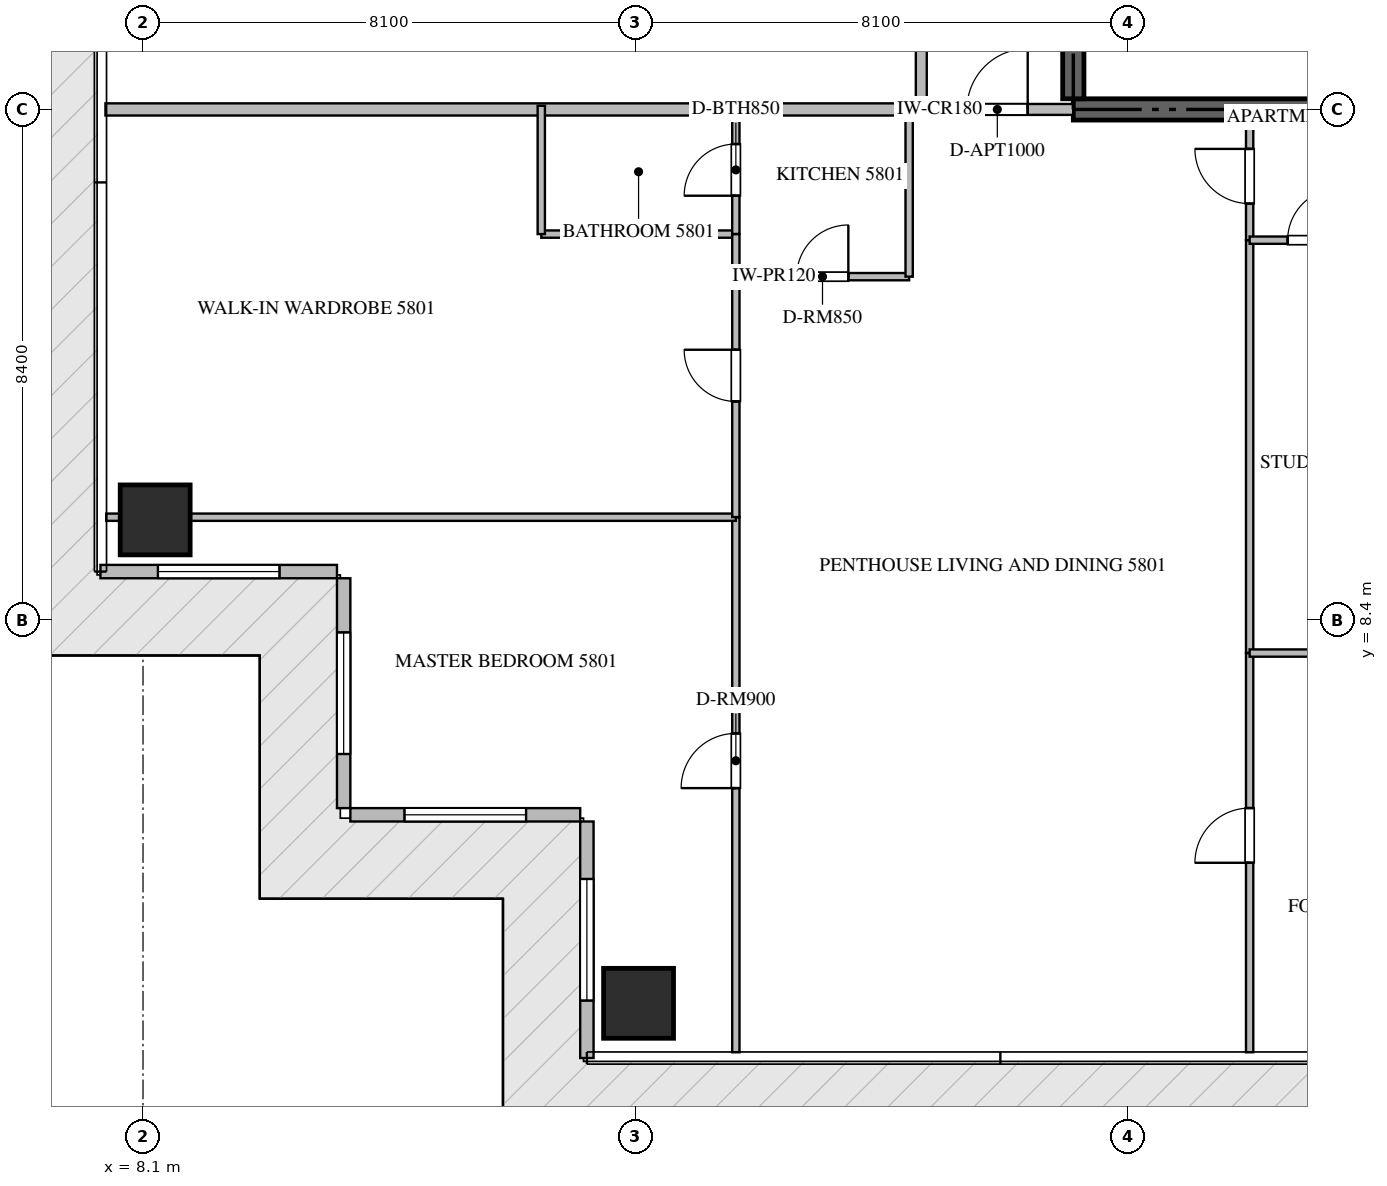
"""IFC4 building model, lengths in metres.
Left out: names, types, materials, properties, quantities, classifications, styles, units other than length and angle.
Written with IfcOpenShell. Run it as: python <this file> out.ifc"""

import sys

from ifc_helpers import new_model, si_unit, direction, frame, frame_2d, origin, origin_2d, place, context, subcontext, project, spatial, rectangle, extrude, source, transform, mapped, element, fill, save


model = new_model("IFC4")
c1 = context("Model", 3, precision=1e-05, world=origin(), true_north=direction((0.0, 1.0)))
c2 = subcontext(c1, "Body", "Model", "MODEL_VIEW")
j1 = project(units=[si_unit("LENGTHUNIT", "METRE"), si_unit("PLANEANGLEUNIT", "RADIAN")], contexts=[c1])
p1 = place(None, origin())
s1 = spatial("IfcSite", under=j1, at=p1, CompositionType="ELEMENT")
p2 = place(p1, origin())
s2 = spatial("IfcBuilding", under=s1, at=p2, CompositionType="ELEMENT")
p3 = place(p2, frame((0.0, 0.0, 233.55)))
s3 = spatial("IfcBuildingStorey", under=s2, at=p3, CompositionType="ELEMENT", Elevation=233.55)
p4 = place(p3, frame((23.4, 16.8, -0.26), z_axis=(0.0, 0.0, 1.0), x_axis=(1.0, 0.0, 0.0)))
e1 = element("IfcWall", 1, at=p4, inside=s3, PredefinedType="SHEAR", context=c2, shape_type="SweptSolid", body=[
    extrude(rectangle(XDim=18.0, YDim=0.35, at=frame_2d((9.0, 0.0))), origin(), (0.0, 0.0, 1.0), 3.848),
])
p5 = place(p3, frame((23.4, 16.975, -0.26), z_axis=(0.0, 0.0, 1.0), x_axis=(0.0, 1.0, 0.0)))
e2 = element("IfcWall", 2, at=p5, inside=s3, PredefinedType="SHEAR", context=c2, shape_type="SweptSolid", body=[
    extrude(rectangle(XDim=4.875, YDim=0.35, at=frame_2d((2.438, 0.0))), origin(), (0.0, 0.0, 1.0), 3.848),
])
m1 = source(origin(), c2, "Body", "SweptSolid", [
    extrude(rectangle(XDim=1.15, YDim=1.15, at=origin_2d()), origin(), (0.0, 0.0, 1.0), 3.85),
])
for number, where, z_axis, x_axis in (
    (3, (16.25, 2.1, -0.26), (0.0, 0.0, 1.0), (1.0, 0.0, 0.0)),
    (4, (8.3, 10.05, -0.26), (0.0, 0.0, 1.0), (1.0, 0.0, 0.0)),
):
    element("IfcColumn", number, at=place(p3, frame(where, z_axis=z_axis, x_axis=x_axis)), inside=s3, PredefinedType="COLUMN", context=c2, shape_type="MappedRepresentation", body=[
        mapped(m1, transform((0.0, 0.0, 0.0), scale=1.0)),
    ])
p6 = place(p3, frame((7.4, 9.2, 0.0), z_axis=(0.0, 0.0, 1.0), x_axis=(1.0, 0.0, 0.0)))
e5 = element("IfcWall", 5, at=p6, inside=s3, PredefinedType="ELEMENTEDWALL", context=c2, shape_type="SweptSolid", body=[
    extrude(rectangle(XDim=3.89, YDim=0.22, at=frame_2d((1.945, 0.0))), origin(), (0.0, 0.0, 1.0), 3.575),
])
p7 = place(p6, frame((0.945, 0.0, 0.65)))
e6 = element("IfcOpeningElement", 6, at=p7, cuts=e5, PredefinedType="OPENING", context=c2, shape_type="SweptSolid", body=[
    extrude(rectangle(XDim=2.0, YDim=2.2, at=frame_2d((1.0, 1.1))), frame((0.0, 0.12, 0.0), z_axis=(0.0, -1.0, 0.0), x_axis=(1.0, 0.0, 0.0)), (0.0, 0.0, 1.0), 0.24),
])
p8 = place(p3, frame((11.4, 9.09, 0.0), z_axis=(0.0, 0.0, 1.0), x_axis=(0.0, -1.0, 0.0)))
e7 = element("IfcWall", 7, at=p8, inside=s3, PredefinedType="ELEMENTEDWALL", context=c2, shape_type="SweptSolid", body=[
    extrude(rectangle(XDim=3.78, YDim=0.22, at=frame_2d((1.89, 0.0))), origin(), (0.0, 0.0, 1.0), 3.575),
])
p9 = place(p8, frame((0.89, 0.0, 0.65)))
e8 = element("IfcOpeningElement", 8, at=p9, cuts=e7, PredefinedType="OPENING", context=c2, shape_type="SweptSolid", body=[
    extrude(rectangle(XDim=2.0, YDim=2.2, at=frame_2d((1.0, 1.1))), frame((0.0, 0.12, 0.0), z_axis=(0.0, -1.0, 0.0), x_axis=(1.0, 0.0, 0.0)), (0.0, 0.0, 1.0), 0.24),
])
p10 = place(p3, frame((11.51, 5.2, 0.0), z_axis=(0.0, 0.0, 1.0), x_axis=(1.0, 0.0, 0.0)))
e9 = element("IfcWall", 9, at=p10, inside=s3, PredefinedType="ELEMENTEDWALL", context=c2, shape_type="SweptSolid", body=[
    extrude(rectangle(XDim=3.78, YDim=0.22, at=frame_2d((1.89, 0.0))), origin(), (0.0, 0.0, 1.0), 3.575),
])
p11 = place(p10, frame((0.89, 0.0, 0.65)))
e10 = element("IfcOpeningElement", 10, at=p11, cuts=e9, PredefinedType="OPENING", context=c2, shape_type="SweptSolid", body=[
    extrude(rectangle(XDim=2.0, YDim=2.2, at=frame_2d((1.0, 1.1))), frame((0.0, 0.12, 0.0), z_axis=(0.0, -1.0, 0.0), x_axis=(1.0, 0.0, 0.0)), (0.0, 0.0, 1.0), 0.24),
])
p12 = place(p3, frame((15.4, 5.09, 0.0), z_axis=(0.0, 0.0, 1.0), x_axis=(0.0, -1.0, 0.0)))
e11 = element("IfcWall", 11, at=p12, inside=s3, PredefinedType="ELEMENTEDWALL", context=c2, shape_type="SweptSolid", body=[
    extrude(rectangle(XDim=3.89, YDim=0.22, at=frame_2d((1.945, 0.0))), origin(), (0.0, 0.0, 1.0), 3.575),
])
p13 = place(p12, frame((0.945, 0.0, 0.65)))
e12 = element("IfcOpeningElement", 12, at=p13, cuts=e11, PredefinedType="OPENING", context=c2, shape_type="SweptSolid", body=[
    extrude(rectangle(XDim=2.0, YDim=2.2, at=frame_2d((1.0, 1.1))), frame((0.0, 0.12, 0.0), z_axis=(0.0, -1.0, 0.0), x_axis=(1.0, 0.0, 0.0)), (0.0, 0.0, 1.0), 0.24),
])
p14 = place(p3, frame((7.482, 16.8, 0.0), z_axis=(0.0, 0.0, 1.0), x_axis=(1.0, 0.0, 0.0)))
e13 = element("IfcWall", 13, at=p14, inside=s3, PredefinedType="PARTITIONING", context=c2, shape_type="SweptSolid", body=[
    extrude(rectangle(XDim=13.418, YDim=0.2, at=frame_2d((6.709, 0.0))), origin(), (0.0, 0.0, 1.0), 3.59),
])
p15 = place(p3, frame((20.902, 16.8, 0.0), z_axis=(0.0, 0.0, 1.0), x_axis=(1.0, 0.0, 0.0)))
e14 = element("IfcWall", 14, at=p15, inside=s3, PredefinedType="PARTITIONING", context=c2, shape_type="SweptSolid", body=[
    extrude(rectangle(XDim=2.496, YDim=0.18, at=frame_2d((1.248, 0.0))), origin(), (0.0, 0.0, 1.0), 3.59),
])
p16 = place(p15, frame((0.748, 0.0, 0.0)))
e15 = element("IfcOpeningElement", 15, at=p16, cuts=e14, PredefinedType="OPENING", context=c2, shape_type="SweptSolid", body=[
    extrude(rectangle(XDim=1.0, YDim=2.15, at=frame_2d((0.5, 1.075))), frame((0.0, 0.1, 0.0), z_axis=(0.0, -1.0, 0.0), x_axis=(1.0, 0.0, 0.0)), (0.0, 0.0, 1.0), 0.2),
])
p17 = place(p3, frame((20.9, 16.8, 0.0), z_axis=(0.0, 0.0, 1.0), x_axis=(0.0, 1.0, 0.0)))
e16 = element("IfcWall", 16, at=p17, inside=s3, PredefinedType="PARTITIONING", context=c2, shape_type="SweptSolid", body=[
    extrude(rectangle(XDim=16.8, YDim=0.18, at=frame_2d((8.4, 0.0))), origin(), (0.0, 0.0, 1.0), 3.59),
])
p18 = place(p17, frame((2.67, 0.0, 0.0)))
e17 = element("IfcOpeningElement", 17, at=p18, cuts=e16, PredefinedType="OPENING", context=c2, shape_type="SweptSolid", body=[
    extrude(rectangle(XDim=1.0, YDim=2.15, at=frame_2d((0.5, 1.075))), frame((0.0, 0.1, 0.0), z_axis=(0.0, -1.0, 0.0), x_axis=(1.0, 0.0, 0.0)), (0.0, 0.0, 1.0), 0.2),
])
p19 = place(p17, frame((11.107, 0.0, 0.0)))
e18 = element("IfcOpeningElement", 18, at=p19, cuts=e16, PredefinedType="OPENING", context=c2, shape_type="SweptSolid", body=[
    extrude(rectangle(XDim=1.0, YDim=2.15, at=frame_2d((0.5, 1.075))), frame((0.0, 0.1, 0.0), z_axis=(0.0, -1.0, 0.0), x_axis=(1.0, 0.0, 0.0)), (0.0, 0.0, 1.0), 0.2),
])
p20 = place(p3, frame((17.85, 14.05, 0.0), z_axis=(0.0, 0.0, 1.0), x_axis=(1.0, 0.0, 0.0)))
e19 = element("IfcWall", 19, at=p20, inside=s3, PredefinedType="PARTITIONING", context=c2, shape_type="SweptSolid", body=[
    extrude(rectangle(XDim=2.85, YDim=0.12, at=frame_2d((1.425, 0.0))), origin(), (0.0, 0.0, 1.0), 3.59),
])
p21 = place(p20, frame((1.0, 0.0, 0.0)))
e20 = element("IfcOpeningElement", 20, at=p21, cuts=e19, PredefinedType="OPENING", context=c2, shape_type="SweptSolid", body=[
    extrude(rectangle(XDim=0.85, YDim=2.1, at=frame_2d((0.425, 1.05))), frame((0.0, 0.07, 0.0), z_axis=(0.0, -1.0, 0.0), x_axis=(1.0, 0.0, 0.0)), (0.0, 0.0, 1.0), 0.14),
])
p22 = place(p3, frame((20.7, 14.05, 0.0), z_axis=(0.0, 0.0, 1.0), x_axis=(0.0, 1.0, 0.0)))
e21 = element("IfcWall", 21, at=p22, inside=s3, PredefinedType="PARTITIONING", context=c2, shape_type="SweptSolid", body=[
    extrude(rectangle(XDim=2.81, YDim=0.12, at=frame_2d((1.405, 0.0))), origin(), (0.0, 0.0, 1.0), 3.59),
])
p23 = place(p3, frame((17.85, 1.295, 0.0), z_axis=(0.0, 0.0, 1.0), x_axis=(0.0, 1.0, 0.0)))
e22 = element("IfcWall", 22, at=p23, inside=s3, PredefinedType="PARTITIONING", context=c2, shape_type="SweptSolid", body=[
    extrude(rectangle(XDim=8.799, YDim=0.12, at=frame_2d((4.399, 0.0))), origin(), (0.0, 0.0, 1.0), 3.59),
])
p24 = place(p23, frame((4.344, 0.0, 0.0)))
e23 = element("IfcOpeningElement", 23, at=p24, cuts=e22, PredefinedType="OPENING", context=c2, shape_type="SweptSolid", body=[
    extrude(rectangle(XDim=0.9, YDim=2.1, at=frame_2d((0.45, 1.05))), frame((0.0, 0.07, 0.0), z_axis=(0.0, -1.0, 0.0), x_axis=(1.0, 0.0, 0.0)), (0.0, 0.0, 1.0), 0.14),
])
p25 = place(p3, frame((7.495, 10.094, 0.0), z_axis=(0.0, 0.0, 1.0), x_axis=(1.0, 0.0, 0.0)))
e24 = element("IfcWall", 24, at=p25, inside=s3, PredefinedType="PARTITIONING", context=c2, shape_type="SweptSolid", body=[
    extrude(rectangle(XDim=10.355, YDim=0.12, at=frame_2d((5.177, 0.0))), origin(), (0.0, 0.0, 1.0), 3.122),
])
p26 = place(p3, frame((14.65, 14.75, 0.0), z_axis=(0.0, 0.0, 1.0), x_axis=(1.0, 0.0, 0.0)))
e25 = element("IfcWall", 25, at=p26, inside=s3, PredefinedType="PARTITIONING", context=c2, shape_type="SweptSolid", body=[
    extrude(rectangle(XDim=3.2, YDim=0.12, at=frame_2d((1.6, 0.0))), origin(), (0.0, 0.0, 1.0), 3.59),
])
p27 = place(p3, frame((14.65, 14.75, 0.0), z_axis=(0.0, 0.0, 1.0), x_axis=(0.0, 1.0, 0.0)))
e26 = element("IfcWall", 26, at=p27, inside=s3, PredefinedType="PARTITIONING", context=c2, shape_type="SweptSolid", body=[
    extrude(rectangle(XDim=2.11, YDim=0.12, at=frame_2d((1.055, 0.0))), origin(), (0.0, 0.0, 1.0), 3.59),
])
p28 = place(p3, frame((17.85, 10.096, 0.0), z_axis=(0.0, 0.0, 1.0), x_axis=(0.0, 1.0, 0.0)))
e27 = element("IfcWall", 27, at=p28, inside=s3, PredefinedType="PARTITIONING", context=c2, shape_type="SweptSolid", body=[
    extrude(rectangle(XDim=4.654, YDim=0.12, at=frame_2d((2.327, 0.0))), origin(), (0.0, 0.0, 1.0), 3.59),
])
p29 = place(p28, frame((1.902, 0.0, 0.0)))
e28 = element("IfcOpeningElement", 28, at=p29, cuts=e27, PredefinedType="OPENING", context=c2, shape_type="SweptSolid", body=[
    extrude(rectangle(XDim=0.85, YDim=2.1, at=frame_2d((0.425, 1.05))), frame((0.0, 0.07, 0.0), z_axis=(0.0, -1.0, 0.0), x_axis=(1.0, 0.0, 0.0)), (0.0, 0.0, 1.0), 0.14),
])
p30 = place(p3, frame((17.85, 14.752, 0.0), z_axis=(0.0, 0.0, 1.0), x_axis=(0.0, 1.0, 0.0)))
e29 = element("IfcWall", 29, at=p30, inside=s3, PredefinedType="PARTITIONING", context=c2, shape_type="SweptSolid", body=[
    extrude(rectangle(XDim=2.108, YDim=0.12, at=frame_2d((1.054, 0.0))), origin(), (0.0, 0.0, 1.0), 3.59),
])
p31 = place(p30, frame((0.629, 0.0, 0.0)))
e30 = element("IfcOpeningElement", 30, at=p31, cuts=e29, PredefinedType="OPENING", context=c2, shape_type="SweptSolid", body=[
    extrude(rectangle(XDim=0.85, YDim=2.1, at=frame_2d((0.425, 1.05))), frame((0.0, 0.07, 0.0), z_axis=(0.0, -1.0, 0.0), x_axis=(1.0, 0.0, 0.0)), (0.0, 0.0, 1.0), 0.14),
])
p32 = place(p3, frame((26.3, 14.65, 0.0), z_axis=(0.0, 0.0, 1.0), x_axis=(0.0, 1.0, 0.0)))
e31 = element("IfcWall", 31, at=p32, inside=s3, PredefinedType="PARTITIONING", context=c2, shape_type="SweptSolid", body=[
    extrude(rectangle(XDim=1.975, YDim=0.12, at=frame_2d((0.988, 0.0))), origin(), (0.0, 0.0, 1.0), 3.59),
])
p33 = place(p32, frame((0.601, 0.0, 0.0)))
e32 = element("IfcOpeningElement", 32, at=p33, cuts=e31, PredefinedType="OPENING", context=c2, shape_type="SweptSolid", body=[
    extrude(rectangle(XDim=0.9, YDim=2.1, at=frame_2d((0.45, 1.05))), frame((0.0, 0.07, 0.0), z_axis=(0.0, -1.0, 0.0), x_axis=(1.0, 0.0, 0.0)), (0.0, 0.0, 1.0), 0.14),
])
p34 = place(p3, frame((26.3, 1.295, 0.0), z_axis=(0.0, 0.0, 1.0), x_axis=(0.0, 1.0, 0.0)))
e33 = element("IfcWall", 33, at=p34, inside=s3, PredefinedType="PARTITIONING", context=c2, shape_type="SweptSolid", body=[
    extrude(rectangle(XDim=6.565, YDim=0.12, at=frame_2d((3.283, 0.0))), origin(), (0.0, 0.0, 1.0), 3.59),
])
p35 = place(p34, frame((3.116, 0.0, 0.0)))
e34 = element("IfcOpeningElement", 34, at=p35, cuts=e33, PredefinedType="OPENING", context=c2, shape_type="SweptSolid", body=[
    extrude(rectangle(XDim=0.9, YDim=2.1, at=frame_2d((0.45, 1.05))), frame((0.0, 0.07, 0.0), z_axis=(0.0, -1.0, 0.0), x_axis=(1.0, 0.0, 0.0)), (0.0, 0.0, 1.0), 0.14),
])
p36 = place(p3, frame((26.3, 7.862, 0.0), z_axis=(0.0, 0.0, 1.0), x_axis=(0.0, 1.0, 0.0)))
e35 = element("IfcWall", 35, at=p36, inside=s3, PredefinedType="PARTITIONING", context=c2, shape_type="SweptSolid", body=[
    extrude(rectangle(XDim=6.786, YDim=0.12, at=frame_2d((3.393, 0.0))), origin(), (0.0, 0.0, 1.0), 3.59),
])
p37 = place(p3, frame((26.3, 7.86, 0.0), z_axis=(0.0, 0.0, 1.0), x_axis=(1.0, 0.0, 0.0)))
e36 = element("IfcWall", 36, at=p37, inside=s3, PredefinedType="PARTITIONING", context=c2, shape_type="SweptSolid", body=[
    extrude(rectangle(XDim=5.15, YDim=0.12, at=frame_2d((2.575, 0.0))), origin(), (0.0, 0.0, 1.0), 3.59),
])
p38 = place(p3, frame((26.3, 14.65, 0.0), z_axis=(0.0, 0.0, 1.0), x_axis=(1.0, 0.0, 0.0)))
e37 = element("IfcWall", 37, at=p38, inside=s3, PredefinedType="PARTITIONING", context=c2, shape_type="SweptSolid", body=[
    extrude(rectangle(XDim=2.1, YDim=0.12, at=frame_2d((1.05, 0.0))), origin(), (0.0, 0.0, 1.0), 3.59),
])
p39 = place(p38, frame((0.625, 0.0, 0.0)))
e38 = element("IfcOpeningElement", 38, at=p39, cuts=e37, PredefinedType="OPENING", context=c2, shape_type="SweptSolid", body=[
    extrude(rectangle(XDim=0.85, YDim=2.1, at=frame_2d((0.425, 1.05))), frame((0.0, 0.07, 0.0), z_axis=(0.0, -1.0, 0.0), x_axis=(1.0, 0.0, 0.0)), (0.0, 0.0, 1.0), 0.14),
])
m2 = source(origin(), c2, "Body", "SweptSolid", [
    extrude(rectangle(XDim=2.0, YDim=2.2, at=frame_2d((1.0, 1.1))), frame((0.0, 0.03, 0.0), z_axis=(0.0, -1.0, 0.0), x_axis=(1.0, 0.0, 0.0)), (0.0, 0.0, 1.0), 0.06),
])
p40 = place(p7, origin())
e39 = element("IfcWindow", 39, at=p40, inside=s3, PartitioningType="SINGLE_PANEL", PredefinedType="WINDOW", context=c2, shape_type="MappedRepresentation", body=[
    mapped(m2, transform((0.0, 0.0, 0.0), scale=1.0)),
])
fill(e6, e39)
p41 = place(p9, origin())
e40 = element("IfcWindow", 40, at=p41, inside=s3, PartitioningType="SINGLE_PANEL", PredefinedType="WINDOW", context=c2, shape_type="MappedRepresentation", body=[
    mapped(m2, transform((0.0, 0.0, 0.0), scale=1.0)),
])
fill(e8, e40)
p42 = place(p11, origin())
e41 = element("IfcWindow", 41, at=p42, inside=s3, PartitioningType="SINGLE_PANEL", PredefinedType="WINDOW", context=c2, shape_type="MappedRepresentation", body=[
    mapped(m2, transform((0.0, 0.0, 0.0), scale=1.0)),
])
fill(e10, e41)
p43 = place(p13, origin())
e42 = element("IfcWindow", 42, at=p43, inside=s3, PartitioningType="SINGLE_PANEL", PredefinedType="WINDOW", context=c2, shape_type="MappedRepresentation", body=[
    mapped(m2, transform((0.0, 0.0, 0.0), scale=1.0)),
])
fill(e12, e42)
m3 = source(origin(), c2, "Body", "SweptSolid", [
    extrude(rectangle(XDim=1.0, YDim=2.15, at=frame_2d((0.5, 1.075))), frame((0.0, 0.025, 0.0), z_axis=(0.0, -1.0, 0.0), x_axis=(1.0, 0.0, 0.0)), (0.0, 0.0, 1.0), 0.05),
])
p44 = place(p16, origin())
e43 = element("IfcDoor", 43, at=p44, inside=s3, OperationType="SINGLE_SWING_RIGHT", PredefinedType="DOOR", context=c2, shape_type="MappedRepresentation", body=[
    mapped(m3, transform((0.0, 0.0, 0.0), scale=1.0)),
])
fill(e15, e43)
m4 = source(origin(), c2, "Body", "SweptSolid", [
    extrude(rectangle(XDim=0.85, YDim=2.1, at=frame_2d((0.425, 1.05))), frame((0.0, 0.025, 0.0), z_axis=(0.0, -1.0, 0.0), x_axis=(1.0, 0.0, 0.0)), (0.0, 0.0, 1.0), 0.05),
])
p45 = place(p21, origin())
e44 = element("IfcDoor", 44, at=p45, inside=s3, OperationType="SINGLE_SWING_RIGHT", PredefinedType="DOOR", context=c2, shape_type="MappedRepresentation", body=[
    mapped(m4, transform((0.0, 0.0, 0.0), scale=1.0)),
])
fill(e20, e44)
m5 = source(origin(), c2, "Body", "SweptSolid", [
    extrude(rectangle(XDim=0.9, YDim=2.1, at=frame_2d((0.45, 1.05))), frame((0.0, 0.025, 0.0), z_axis=(0.0, -1.0, 0.0), x_axis=(1.0, 0.0, 0.0)), (0.0, 0.0, 1.0), 0.05),
])
p46 = place(p24, origin())
e45 = element("IfcDoor", 45, at=p46, inside=s3, OperationType="SINGLE_SWING_LEFT", PredefinedType="DOOR", context=c2, shape_type="MappedRepresentation", body=[
    mapped(m5, transform((0.0, 0.0, 0.0), scale=1.0)),
])
fill(e23, e45)
p47 = place(p29, origin())
e46 = element("IfcDoor", 46, at=p47, inside=s3, OperationType="SINGLE_SWING_RIGHT", PredefinedType="DOOR", context=c2, shape_type="MappedRepresentation", body=[
    mapped(m4, transform((0.0, 0.0, 0.0), scale=1.0)),
])
fill(e28, e46)
p48 = place(p31, origin())
e47 = element("IfcDoor", 47, at=p48, inside=s3, OperationType="SINGLE_SWING_LEFT", PredefinedType="DOOR", context=c2, shape_type="MappedRepresentation", body=[
    mapped(m4, transform((0.0, 0.0, 0.0), scale=1.0)),
])
fill(e30, e47)
p49 = place(p33, origin())
e48 = element("IfcDoor", 48, at=p49, inside=s3, OperationType="SINGLE_SWING_RIGHT", PredefinedType="DOOR", context=c2, shape_type="MappedRepresentation", body=[
    mapped(m5, transform((0.0, 0.0, 0.0), scale=1.0)),
])
fill(e32, e48)
p50 = place(p35, origin())
e49 = element("IfcDoor", 49, at=p50, inside=s3, OperationType="SINGLE_SWING_LEFT", PredefinedType="DOOR", context=c2, shape_type="MappedRepresentation", body=[
    mapped(m5, transform((0.0, 0.0, 0.0), scale=1.0)),
])
fill(e34, e49)
p51 = place(p39, origin())
e50 = element("IfcDoor", 50, at=p51, inside=s3, OperationType="SINGLE_SWING_RIGHT", PredefinedType="DOOR", context=c2, shape_type="MappedRepresentation", body=[
    mapped(m4, transform((0.0, 0.0, 0.0), scale=1.0)),
])
fill(e38, e50)
save(model, sys.argv[1])
